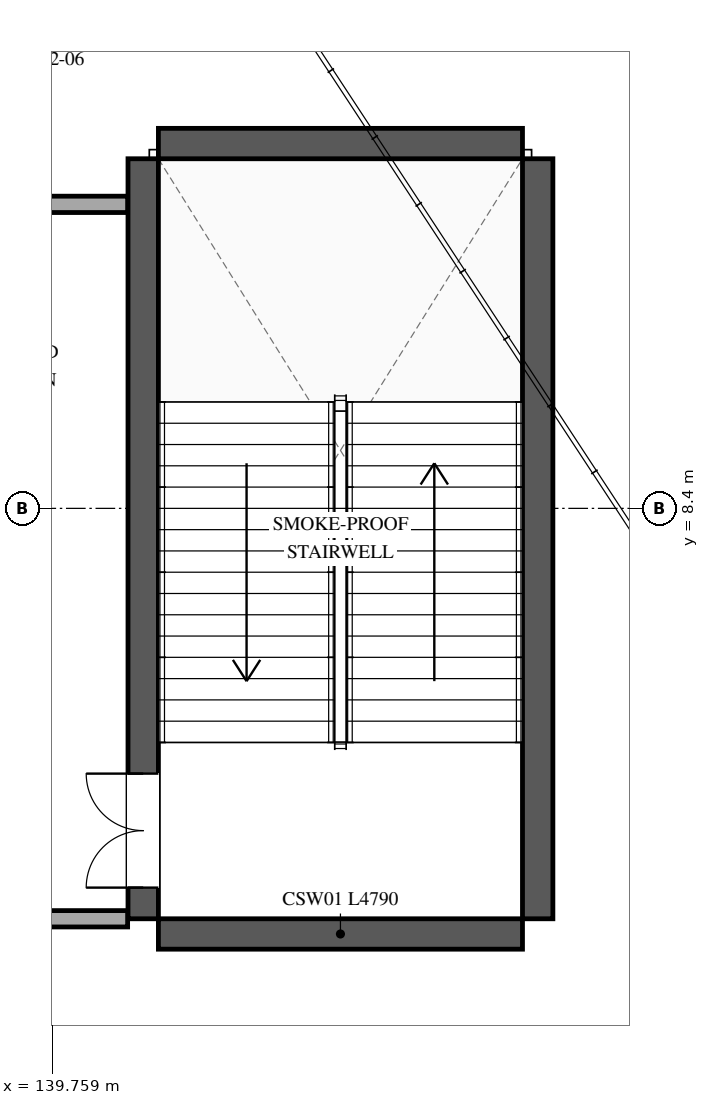
"""IFC4 building model, lengths in metres.
Left out: names, types, materials, properties, quantities, classifications, styles, units other than length and angle.
Written with IfcOpenShell. Run it as: python <this file> out.ifc"""

import sys

from ifc_helpers import new_model, si_unit, direction, frame, frame_2d, origin, place, context, subcontext, project, spatial, rectangle, extrude, element, fill, save


model = new_model("IFC4")
c1 = context("Model", 3, precision=1e-05, world=origin(), true_north=direction((0.0, 1.0)))
c2 = subcontext(c1, "Body", "Model", "MODEL_VIEW")
j1 = project(units=[si_unit("LENGTHUNIT", "METRE"), si_unit("PLANEANGLEUNIT", "RADIAN")], contexts=[c1])
p1 = place(None, origin())
s1 = spatial("IfcSite", under=j1, at=p1, CompositionType="ELEMENT")
p2 = place(p1, origin())
s2 = spatial("IfcBuilding", under=s1, at=p2, CompositionType="ELEMENT")
p3 = place(p2, frame((0.0, 0.0, 11.4)))
s3 = spatial("IfcBuildingStorey", under=s2, at=p3, CompositionType="ELEMENT", Elevation=11.4)
p4 = place(p3, frame((140.955, 3.0, 0.0), z_axis=(0.0, 0.0, 1.0), x_axis=(0.0, 1.0, 0.0)))
e1 = element("IfcWall", 1, at=p4, inside=s3, PredefinedType="SHEAR", context=c2, shape_type="SweptSolid", body=[
    extrude(rectangle(XDim=10.0, YDim=0.4, at=frame_2d((5.0, 0.0))), origin(), (0.0, 0.0, 1.0), 5.1),
])
p5 = place(p4, frame((0.41, 0.0, 0.0)))
e2 = element("IfcOpeningElement", 2, at=p5, cuts=e1, PredefinedType="OPENING", context=c2, shape_type="SweptSolid", body=[
    extrude(rectangle(XDim=1.5, YDim=2.2, at=frame_2d((0.75, 1.1))), frame((0.0, 0.21, 0.0), z_axis=(0.0, -1.0, 0.0), x_axis=(1.0, 0.0, 0.0)), (0.0, 0.0, 1.0), 0.42),
])
p6 = place(p3, frame((146.145, 13.0, 0.0), z_axis=(0.0, 0.0, 1.0), x_axis=(0.0, -1.0, 0.0)))
e3 = element("IfcWall", 3, at=p6, inside=s3, PredefinedType="SHEAR", context=c2, shape_type="SweptSolid", body=[
    extrude(rectangle(XDim=10.0, YDim=0.4, at=frame_2d((5.0, 0.0))), origin(), (0.0, 0.0, 1.0), 5.1),
])
for number, where, z_axis, x_axis in (
    (4, (145.945, 2.8, 0.0), (0.0, 0.0, 1.0), (-1.0, 0.0, 0.0)),
    (5, (141.155, 13.2, 0.0), (0.0, 0.0, 1.0), (1.0, 0.0, 0.0)),
):
    element("IfcWall", number, at=place(p3, frame(where, z_axis=z_axis, x_axis=x_axis)), inside=s3, PredefinedType="SHEAR", context=c2, shape_type="SweptSolid", body=[
        extrude(rectangle(XDim=4.79, YDim=0.4, at=frame_2d((2.395, 0.0))), origin(), (0.0, 0.0, 1.0), 5.1),
    ])
p7 = place(p3, frame((121.8, 12.4, 0.0), z_axis=(0.0, 0.0, 1.0), x_axis=(1.0, 0.0, 0.0)))
e6 = element("IfcWall", 6, at=p7, inside=s3, PredefinedType="PARTITIONING", context=c2, shape_type="SweptSolid", body=[
    extrude(rectangle(XDim=18.95, YDim=0.215, at=frame_2d((9.475, 0.0))), origin(), (0.0, 0.0, 1.0), 4.045),
])
p8 = place(p7, frame((8.8, 0.0, 0.0)))
e7 = element("IfcOpeningElement", 7, at=p8, cuts=e6, PredefinedType="OPENING", context=c2, shape_type="SweptSolid", body=[
    extrude(rectangle(XDim=1.35, YDim=2.2, at=frame_2d((0.675, 1.1))), frame((0.0, 0.118, 0.0), z_axis=(0.0, -1.0, 0.0), x_axis=(1.0, 0.0, 0.0)), (0.0, 0.0, 1.0), 0.235),
])
p9 = place(p3, frame((140.75, 3.0, 0.0), z_axis=(0.0, 0.0, 1.0), x_axis=(-1.0, 0.0, 0.0)))
e8 = element("IfcWall", 8, at=p9, inside=s3, PredefinedType="PARTITIONING", context=c2, shape_type="SweptSolid", body=[
    extrude(rectangle(XDim=4.35, YDim=0.215, at=frame_2d((2.175, 0.0))), origin(), (0.0, 0.0, 1.0), 4.045),
])
p10 = place(p5, origin())
e9 = element("IfcDoor", 9, at=p10, inside=s3, OperationType="DOUBLE_DOOR_SINGLE_SWING", PredefinedType="DOOR", context=c2, shape_type="SweptSolid", body=[
    extrude(rectangle(XDim=1.5, YDim=2.2, at=frame_2d((0.75, 1.1))), frame((0.0, 0.025, 0.0), z_axis=(0.0, -1.0, 0.0), x_axis=(1.0, 0.0, 0.0)), (0.0, 0.0, 1.0), 0.05),
])
fill(e2, e9)
save(model, sys.argv[1])
